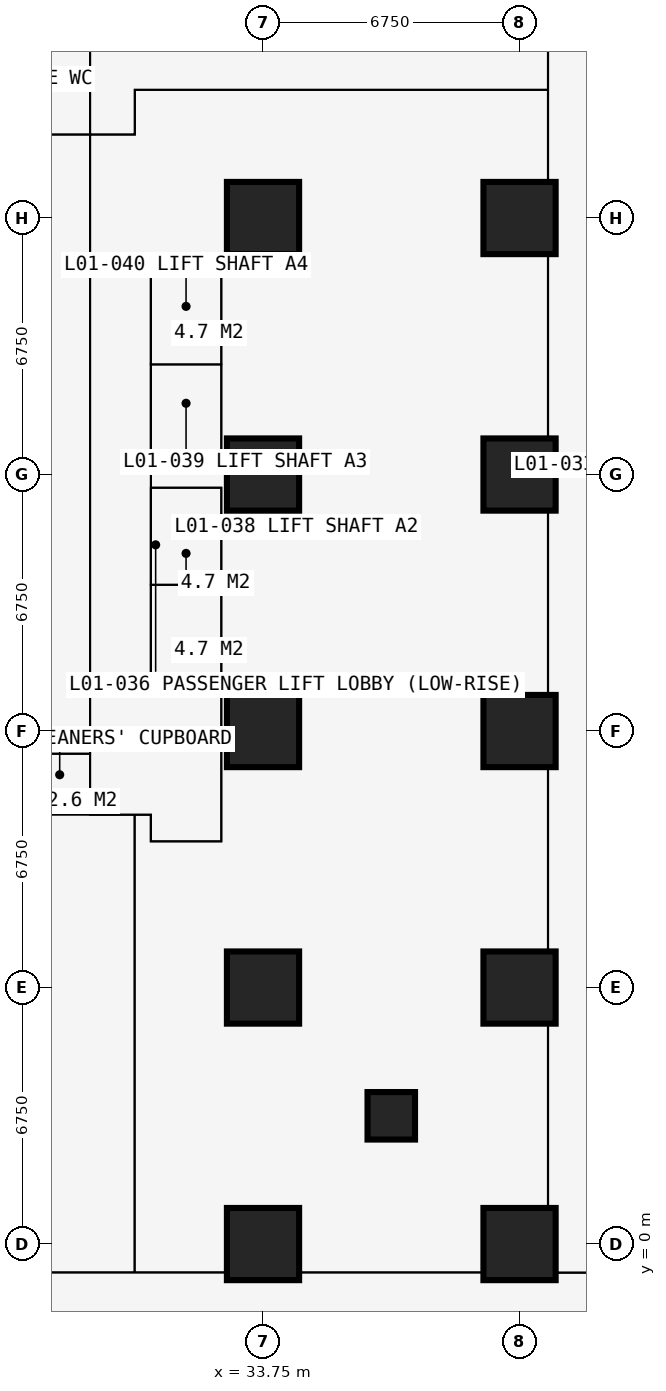
"""IFC4 building model, lengths in metres.
Left out: names, types, materials, properties, quantities, classifications, styles, units other than length and angle.
Written with IfcOpenShell. Run it as: python <this file> out.ifc"""

import sys

from ifc_helpers import new_model, si_unit, direction, frame, frame_2d, origin, origin_2d, place, context, subcontext, project, spatial, rectangle, extrude, element, fill, save


model = new_model("IFC4")
c1 = context("Model", 3, precision=1e-05, world=origin(), true_north=direction((0.0, 1.0)))
c2 = subcontext(c1, "Body", "Model", "MODEL_VIEW")
j1 = project(units=[si_unit("LENGTHUNIT", "METRE"), si_unit("PLANEANGLEUNIT", "RADIAN")], contexts=[c1])
p1 = place(None, origin())
s1 = spatial("IfcSite", under=j1, at=p1, CompositionType="ELEMENT")
p2 = place(p1, origin())
s2 = spatial("IfcBuilding", under=s1, at=p2, CompositionType="ELEMENT")
p3 = place(p2, frame((0.0, 0.0, 4.5)))
s3 = spatial("IfcBuildingStorey", under=s2, at=p3, CompositionType="ELEMENT", Elevation=4.5)
for number, where, z_axis, x_axis in (
    (1, (33.75, 0.0, 0.0), (0.0, 0.0, 1.0), (1.0, 0.0, 0.0)),
    (2, (33.75, 6.75, 0.0), (0.0, 0.0, 1.0), (1.0, 0.0, 0.0)),
    (3, (33.75, 13.5, 0.0), (0.0, 0.0, 1.0), (1.0, 0.0, 0.0)),
    (4, (33.75, 20.25, 0.0), (0.0, 0.0, 1.0), (1.0, 0.0, 0.0)),
    (5, (33.75, 27.0, 0.0), (0.0, 0.0, 1.0), (1.0, 0.0, 0.0)),
):
    element("IfcColumn", number, at=place(p3, frame(where, z_axis=z_axis, x_axis=x_axis)), inside=s3, PredefinedType="COLUMN", context=c2, shape_type="SweptSolid", body=[
        extrude(rectangle(XDim=1.9, YDim=1.9, at=origin_2d()), origin(), (0.0, 0.0, 1.0), 4.5),
    ])
p4 = place(p3, frame((37.125, 3.375, 0.0), z_axis=(0.0, 0.0, 1.0), x_axis=(1.0, 0.0, 0.0)))
e6 = element("IfcColumn", 6, at=p4, inside=s3, PredefinedType="COLUMN", context=c2, shape_type="SweptSolid", body=[
    extrude(rectangle(XDim=1.25, YDim=1.25, at=origin_2d()), origin(), (0.0, 0.0, 1.0), 4.5),
])
for number, where, z_axis, x_axis in (
    (7, (40.5, 0.0, 0.0), (0.0, 0.0, 1.0), (1.0, 0.0, 0.0)),
    (8, (40.5, 6.75, 0.0), (0.0, 0.0, 1.0), (1.0, 0.0, 0.0)),
    (9, (40.5, 13.5, 0.0), (0.0, 0.0, 1.0), (1.0, 0.0, 0.0)),
    (10, (40.5, 20.25, 0.0), (0.0, 0.0, 1.0), (1.0, 0.0, 0.0)),
    (11, (40.5, 27.0, 0.0), (0.0, 0.0, 1.0), (1.0, 0.0, 0.0)),
):
    element("IfcColumn", number, at=place(p3, frame(where, z_axis=z_axis, x_axis=x_axis)), inside=s3, PredefinedType="COLUMN", context=c2, shape_type="SweptSolid", body=[
        extrude(rectangle(XDim=1.9, YDim=1.9, at=origin_2d()), origin(), (0.0, 0.0, 1.0), 4.5),
    ])
p5 = place(p3, frame((-7.484, -0.75, 0.0), z_axis=(0.0, 0.0, 1.0), x_axis=(1.0, 0.0, 0.0)))
e12 = element("IfcWall", 12, at=p5, inside=s3, PredefinedType="PARTITIONING", context=c2, shape_type="SweptSolid", body=[
    extrude(rectangle(XDim=50.334, YDim=0.15, at=frame_2d((25.167, 0.0))), origin(), (0.0, 0.0, 1.0), 4.25),
])
p6 = place(p5, frame((18.384, 0.0, 0.0)))
e13 = element("IfcOpeningElement", 13, at=p6, cuts=e12, PredefinedType="OPENING", context=c2, shape_type="SweptSolid", body=[
    extrude(rectangle(XDim=1.6, YDim=2.4, at=frame_2d((0.8, 1.2))), frame((0.0, 0.085, 0.0), z_axis=(0.0, -1.0, 0.0), x_axis=(1.0, 0.0, 0.0)), (0.0, 0.0, 1.0), 0.17),
])
p7 = place(p5, frame((35.484, 0.0, 0.0)))
e14 = element("IfcOpeningElement", 14, at=p7, cuts=e12, PredefinedType="OPENING", context=c2, shape_type="SweptSolid", body=[
    extrude(rectangle(XDim=1.6, YDim=2.4, at=frame_2d((0.8, 1.2))), frame((0.0, 0.085, 0.0), z_axis=(0.0, -1.0, 0.0), x_axis=(1.0, 0.0, 0.0)), (0.0, 0.0, 1.0), 0.17),
])
p8 = place(p3, frame((8.9, 29.2, 0.0), z_axis=(0.0, 0.0, 1.0), x_axis=(1.0, 0.0, 0.0)))
e15 = element("IfcWall", 15, at=p8, inside=s3, PredefinedType="PARTITIONING", context=c2, shape_type="SweptSolid", body=[
    extrude(rectangle(XDim=21.475, YDim=0.15, at=frame_2d((10.738, 0.0))), origin(), (0.0, 0.0, 1.0), 4.25),
])
p9 = place(p8, frame((16.65, 0.0, 0.0)))
e16 = element("IfcOpeningElement", 16, at=p9, cuts=e15, PredefinedType="OPENING", context=c2, shape_type="SweptSolid", body=[
    extrude(rectangle(XDim=1.0, YDim=2.2, at=frame_2d((0.5, 1.1))), frame((0.0, 0.085, 0.0), z_axis=(0.0, -1.0, 0.0), x_axis=(1.0, 0.0, 0.0)), (0.0, 0.0, 1.0), 0.17),
])
p10 = place(p8, frame((18.75, 0.0, 0.0)))
e17 = element("IfcOpeningElement", 17, at=p10, cuts=e15, PredefinedType="OPENING", context=c2, shape_type="SweptSolid", body=[
    extrude(rectangle(XDim=1.0, YDim=2.2, at=frame_2d((0.5, 1.1))), frame((0.0, 0.085, 0.0), z_axis=(0.0, -1.0, 0.0), x_axis=(1.0, 0.0, 0.0)), (0.0, 0.0, 1.0), 0.17),
])
p11 = place(p8, frame((8.45, 0.0, 0.0)))
e18 = element("IfcOpeningElement", 18, at=p11, cuts=e15, PredefinedType="OPENING", context=c2, shape_type="SweptSolid", body=[
    extrude(rectangle(XDim=1.6, YDim=2.4, at=frame_2d((0.8, 1.2))), frame((0.0, 0.085, 0.0), z_axis=(0.0, -1.0, 0.0), x_axis=(1.0, 0.0, 0.0)), (0.0, 0.0, 1.0), 0.17),
])
p12 = place(p3, frame((10.125, 11.3, 0.0), z_axis=(0.0, 0.0, 1.0), x_axis=(1.0, 0.0, 0.0)))
e19 = element("IfcWall", 19, at=p12, inside=s3, PredefinedType="PARTITIONING", context=c2, shape_type="SweptSolid", body=[
    extrude(rectangle(XDim=20.675, YDim=0.15, at=frame_2d((10.337, 0.0))), origin(), (0.0, 0.0, 1.0), 4.25),
])
p13 = place(p12, frame((1.725, 0.0, 0.0)))
e20 = element("IfcOpeningElement", 20, at=p13, cuts=e19, PredefinedType="OPENING", context=c2, shape_type="SweptSolid", body=[
    extrude(rectangle(XDim=1.0, YDim=2.2, at=frame_2d((0.5, 1.1))), frame((0.0, 0.085, 0.0), z_axis=(0.0, -1.0, 0.0), x_axis=(1.0, 0.0, 0.0)), (0.0, 0.0, 1.0), 0.17),
])
p14 = place(p12, frame((3.825, 0.0, 0.0)))
e21 = element("IfcOpeningElement", 21, at=p14, cuts=e19, PredefinedType="OPENING", context=c2, shape_type="SweptSolid", body=[
    extrude(rectangle(XDim=1.0, YDim=2.2, at=frame_2d((0.5, 1.1))), frame((0.0, 0.085, 0.0), z_axis=(0.0, -1.0, 0.0), x_axis=(1.0, 0.0, 0.0)), (0.0, 0.0, 1.0), 0.17),
])
p15 = place(p12, frame((10.625, 0.0, 0.0)))
e22 = element("IfcOpeningElement", 22, at=p15, cuts=e19, PredefinedType="OPENING", context=c2, shape_type="SweptSolid", body=[
    extrude(rectangle(XDim=1.6, YDim=2.4, at=frame_2d((0.8, 1.2))), frame((0.0, 0.085, 0.0), z_axis=(0.0, -1.0, 0.0), x_axis=(1.0, 0.0, 0.0)), (0.0, 0.0, 1.0), 0.17),
])
p16 = place(p3, frame((27.6, 12.9, 0.0), z_axis=(0.0, 0.0, 1.0), x_axis=(1.0, 0.0, 0.0)))
e23 = element("IfcWall", 23, at=p16, inside=s3, PredefinedType="PARTITIONING", context=c2, shape_type="SweptSolid", body=[
    extrude(rectangle(XDim=1.6, YDim=0.15, at=frame_2d((0.8, 0.0))), origin(), (0.0, 0.0, 1.0), 3.752),
])
p17 = place(p3, frame((29.2, 11.3, 0.0), z_axis=(0.0, 0.0, 1.0), x_axis=(0.0, 1.0, 0.0)))
e24 = element("IfcWall", 24, at=p17, inside=s3, PredefinedType="PARTITIONING", context=c2, shape_type="SweptSolid", body=[
    extrude(rectangle(XDim=20.3, YDim=0.15, at=frame_2d((10.15, 0.0))), origin(), (0.0, 0.0, 1.0), 4.25),
])
p18 = place(p17, frame((15.35, 0.0, 0.0)))
e25 = element("IfcOpeningElement", 25, at=p18, cuts=e24, PredefinedType="OPENING", context=c2, shape_type="SweptSolid", body=[
    extrude(rectangle(XDim=1.6, YDim=2.4, at=frame_2d((0.8, 1.2))), frame((0.0, 0.085, 0.0), z_axis=(0.0, -1.0, 0.0), x_axis=(1.0, 0.0, 0.0)), (0.0, 0.0, 1.0), 0.17),
])
p19 = place(p17, frame((8.35, 0.0, 0.0)))
e26 = element("IfcOpeningElement", 26, at=p19, cuts=e24, PredefinedType="OPENING", context=c2, shape_type="SweptSolid", body=[
    extrude(rectangle(XDim=1.2, YDim=2.2, at=frame_2d((0.6, 1.1))), frame((0.0, 0.085, 0.0), z_axis=(0.0, -1.0, 0.0), x_axis=(1.0, 0.0, 0.0)), (0.0, 0.0, 1.0), 0.17),
])
p20 = place(p3, frame((29.2, 25.7, 0.0), z_axis=(0.0, 0.0, 1.0), x_axis=(1.0, 0.0, 0.0)))
e27 = element("IfcWall", 27, at=p20, inside=s3, PredefinedType="SHEAR", context=c2, shape_type="SweptSolid", body=[
    extrude(rectangle(XDim=3.45, YDim=0.1, at=frame_2d((1.725, 0.0))), origin(), (0.0, 0.0, 1.0), 4.25),
])
p21 = place(p3, frame((30.375, -0.75, 0.0), z_axis=(0.0, 0.0, 1.0), x_axis=(0.0, 1.0, 0.0)))
e28 = element("IfcWall", 28, at=p21, inside=s3, PredefinedType="PARTITIONING", context=c2, shape_type="SweptSolid", body=[
    extrude(rectangle(XDim=12.05, YDim=0.15, at=frame_2d((6.025, 0.0))), origin(), (0.0, 0.0, 1.0), 4.25),
])
p22 = place(p3, frame((30.375, 29.2, 0.0), z_axis=(0.0, 0.0, 1.0), x_axis=(0.0, 1.0, 0.0)))
e29 = element("IfcWall", 29, at=p22, inside=s3, PredefinedType="PARTITIONING", context=c2, shape_type="SweptSolid", body=[
    extrude(rectangle(XDim=1.175, YDim=0.15, at=frame_2d((0.587, 0.0))), origin(), (0.0, 0.0, 1.0), 4.25),
])
p23 = place(p3, frame((30.375, 30.375, 0.0), z_axis=(0.0, 0.0, 1.0), x_axis=(1.0, 0.0, 0.0)))
e30 = element("IfcWall", 30, at=p23, inside=s3, PredefinedType="PARTITIONING", context=c2, shape_type="SweptSolid", body=[
    extrude(rectangle(XDim=10.875, YDim=0.15, at=frame_2d((5.438, 0.0))), origin(), (0.0, 0.0, 1.0), 4.25),
])
p24 = place(p3, frame((30.8, 10.6, 0.0), z_axis=(0.0, 0.0, 1.0), x_axis=(0.0, 1.0, 0.0)))
e31 = element("IfcWall", 31, at=p24, inside=s3, PredefinedType="PARTITIONING", context=c2, shape_type="SweptSolid", body=[
    extrude(rectangle(XDim=0.7, YDim=0.15, at=frame_2d((0.35, 0.0))), origin(), (0.0, 0.0, 1.0), 4.25),
])
p25 = place(p3, frame((30.8, 10.6, 0.0), z_axis=(0.0, 0.0, 1.0), x_axis=(1.0, 0.0, 0.0)))
e32 = element("IfcWall", 32, at=p25, inside=s3, PredefinedType="PARTITIONING", context=c2, shape_type="SweptSolid", body=[
    extrude(rectangle(XDim=1.85, YDim=0.15, at=frame_2d((0.925, 0.0))), origin(), (0.0, 0.0, 1.0), 4.25),
])
p26 = place(p3, frame((30.8, 14.8, 0.0), z_axis=(0.0, 0.0, 1.0), x_axis=(0.0, 1.0, 0.0)))
e33 = element("IfcWall", 33, at=p26, inside=s3, PredefinedType="PARTITIONING", context=c2, shape_type="SweptSolid", body=[
    extrude(rectangle(XDim=10.9, YDim=0.15, at=frame_2d((5.45, 0.0))), origin(), (0.0, 0.0, 1.0), 4.25),
])
p27 = place(p26, frame((0.75, 0.0, 0.0)))
e34 = element("IfcOpeningElement", 34, at=p27, cuts=e33, PredefinedType="OPENING", context=c2, shape_type="SweptSolid", body=[
    extrude(rectangle(XDim=1.1, YDim=2.2, at=frame_2d((0.55, 1.1))), frame((0.0, 0.085, 0.0), z_axis=(0.0, -1.0, 0.0), x_axis=(1.0, 0.0, 0.0)), (0.0, 0.0, 1.0), 0.17),
])
p28 = place(p26, frame((3.25, 0.0, 0.0)))
e35 = element("IfcOpeningElement", 35, at=p28, cuts=e33, PredefinedType="OPENING", context=c2, shape_type="SweptSolid", body=[
    extrude(rectangle(XDim=1.1, YDim=2.2, at=frame_2d((0.55, 1.1))), frame((0.0, 0.085, 0.0), z_axis=(0.0, -1.0, 0.0), x_axis=(1.0, 0.0, 0.0)), (0.0, 0.0, 1.0), 0.17),
])
p29 = place(p26, frame((6.5, 0.0, 0.0)))
e36 = element("IfcOpeningElement", 36, at=p29, cuts=e33, PredefinedType="OPENING", context=c2, shape_type="SweptSolid", body=[
    extrude(rectangle(XDim=1.1, YDim=2.2, at=frame_2d((0.55, 1.1))), frame((0.0, 0.085, 0.0), z_axis=(0.0, -1.0, 0.0), x_axis=(1.0, 0.0, 0.0)), (0.0, 0.0, 1.0), 0.17),
])
p30 = place(p26, frame((9.05, 0.0, 0.0)))
e37 = element("IfcOpeningElement", 37, at=p30, cuts=e33, PredefinedType="OPENING", context=c2, shape_type="SweptSolid", body=[
    extrude(rectangle(XDim=1.1, YDim=2.2, at=frame_2d((0.55, 1.1))), frame((0.0, 0.085, 0.0), z_axis=(0.0, -1.0, 0.0), x_axis=(1.0, 0.0, 0.0)), (0.0, 0.0, 1.0), 0.17),
])
for number, where, z_axis, x_axis in (
    (38, (30.8, 14.8, 0.0), (0.0, 0.0, 1.0), (1.0, 0.0, 0.0)),
    (39, (30.8, 17.35, 0.0), (0.0, 0.0, 1.0), (1.0, 0.0, 0.0)),
    (40, (30.8, 19.9, 0.0), (0.0, 0.0, 1.0), (1.0, 0.0, 0.0)),
    (41, (30.8, 20.6, 0.0), (0.0, 0.0, 1.0), (1.0, 0.0, 0.0)),
    (42, (30.8, 23.15, 0.0), (0.0, 0.0, 1.0), (1.0, 0.0, 0.0)),
):
    element("IfcWall", number, at=place(p3, frame(where, z_axis=z_axis, x_axis=x_axis)), inside=s3, PredefinedType="SHEAR", context=c2, shape_type="SweptSolid", body=[
        extrude(rectangle(XDim=1.85, YDim=0.1, at=frame_2d((0.925, 0.0))), origin(), (0.0, 0.0, 1.0), 4.25),
    ])
p31 = place(p3, frame((32.65, 10.6, 0.0), z_axis=(0.0, 0.0, 1.0), x_axis=(0.0, 1.0, 0.0)))
e43 = element("IfcWall", 43, at=p31, inside=s3, PredefinedType="SHEAR", context=c2, shape_type="SweptSolid", body=[
    extrude(rectangle(XDim=9.3, YDim=0.1, at=frame_2d((4.65, 0.0))), origin(), (0.0, 0.0, 1.0), 4.25),
])
p32 = place(p3, frame((32.65, 20.6, 0.0), z_axis=(0.0, 0.0, 1.0), x_axis=(0.0, 1.0, 0.0)))
e44 = element("IfcWall", 44, at=p32, inside=s3, PredefinedType="PARTITIONING", context=c2, shape_type="SweptSolid", body=[
    extrude(rectangle(XDim=5.1, YDim=0.15, at=frame_2d((2.55, 0.0))), origin(), (0.0, 0.0, 1.0), 4.25),
])
p33 = place(p3, frame((41.25, -0.75, 0.0), z_axis=(0.0, 0.0, 1.0), x_axis=(0.0, 1.0, 0.0)))
e45 = element("IfcWall", 45, at=p33, inside=s3, PredefinedType="PARTITIONING", context=c2, shape_type="SweptSolid", body=[
    extrude(rectangle(XDim=41.984, YDim=0.15, at=frame_2d((20.992, 0.0))), origin(), (0.0, 0.0, 1.0), 4.25),
])
p34 = place(p33, frame((15.2, 0.0, 0.0)))
e46 = element("IfcOpeningElement", 46, at=p34, cuts=e45, PredefinedType="OPENING", context=c2, shape_type="SweptSolid", body=[
    extrude(rectangle(XDim=1.6, YDim=2.4, at=frame_2d((0.8, 1.2))), frame((0.0, 0.085, 0.0), z_axis=(0.0, -1.0, 0.0), x_axis=(1.0, 0.0, 0.0)), (0.0, 0.0, 1.0), 0.17),
])
p35 = place(p18, origin())
e47 = element("IfcDoor", 47, at=p35, inside=s3, OperationType="DOUBLE_DOOR_SINGLE_SWING", PredefinedType="DOOR", context=c2, shape_type="SweptSolid", body=[
    extrude(rectangle(XDim=1.6, YDim=2.4, at=frame_2d((0.8, 1.2))), frame((0.0, 0.025, 0.0), z_axis=(0.0, -1.0, 0.0), x_axis=(1.0, 0.0, 0.0)), (0.0, 0.0, 1.0), 0.05),
])
fill(e25, e47)
p36 = place(p10, origin())
e48 = element("IfcDoor", 48, at=p36, inside=s3, OperationType="SINGLE_SWING_LEFT", PredefinedType="DOOR", context=c2, shape_type="SweptSolid", body=[
    extrude(rectangle(XDim=1.0, YDim=2.2, at=frame_2d((0.5, 1.1))), frame((0.0, 0.025, 0.0), z_axis=(0.0, -1.0, 0.0), x_axis=(1.0, 0.0, 0.0)), (0.0, 0.0, 1.0), 0.05),
])
fill(e17, e48)
p37 = place(p7, origin())
e49 = element("IfcDoor", 49, at=p37, inside=s3, OperationType="DOUBLE_DOOR_SINGLE_SWING", PredefinedType="DOOR", context=c2, shape_type="SweptSolid", body=[
    extrude(rectangle(XDim=1.6, YDim=2.4, at=frame_2d((0.8, 1.2))), frame((0.0, 0.025, 0.0), z_axis=(0.0, -1.0, 0.0), x_axis=(1.0, 0.0, 0.0)), (0.0, 0.0, 1.0), 0.05),
])
fill(e14, e49)
p38 = place(p34, origin())
e50 = element("IfcDoor", 50, at=p38, inside=s3, OperationType="DOUBLE_DOOR_SINGLE_SWING", PredefinedType="DOOR", context=c2, shape_type="SweptSolid", body=[
    extrude(rectangle(XDim=1.6, YDim=2.4, at=frame_2d((0.8, 1.2))), frame((0.0, 0.025, 0.0), z_axis=(0.0, -1.0, 0.0), x_axis=(1.0, 0.0, 0.0)), (0.0, 0.0, 1.0), 0.05),
])
fill(e46, e50)
p39 = place(p27, origin())
e51 = element("IfcDoor", 51, at=p39, inside=s3, OperationType="DOUBLE_DOOR_SLIDING", PredefinedType="DOOR", context=c2, shape_type="SweptSolid", body=[
    extrude(rectangle(XDim=1.1, YDim=2.2, at=frame_2d((0.55, 1.1))), frame((0.0, 0.025, 0.0), z_axis=(0.0, -1.0, 0.0), x_axis=(1.0, 0.0, 0.0)), (0.0, 0.0, 1.0), 0.05),
])
fill(e34, e51)
p40 = place(p28, origin())
e52 = element("IfcDoor", 52, at=p40, inside=s3, OperationType="DOUBLE_DOOR_SLIDING", PredefinedType="DOOR", context=c2, shape_type="SweptSolid", body=[
    extrude(rectangle(XDim=1.1, YDim=2.2, at=frame_2d((0.55, 1.1))), frame((0.0, 0.025, 0.0), z_axis=(0.0, -1.0, 0.0), x_axis=(1.0, 0.0, 0.0)), (0.0, 0.0, 1.0), 0.05),
])
fill(e35, e52)
p41 = place(p29, origin())
e53 = element("IfcDoor", 53, at=p41, inside=s3, OperationType="DOUBLE_DOOR_SLIDING", PredefinedType="DOOR", context=c2, shape_type="SweptSolid", body=[
    extrude(rectangle(XDim=1.1, YDim=2.2, at=frame_2d((0.55, 1.1))), frame((0.0, 0.025, 0.0), z_axis=(0.0, -1.0, 0.0), x_axis=(1.0, 0.0, 0.0)), (0.0, 0.0, 1.0), 0.05),
])
fill(e36, e53)
p42 = place(p30, origin())
e54 = element("IfcDoor", 54, at=p42, inside=s3, OperationType="DOUBLE_DOOR_SLIDING", PredefinedType="DOOR", context=c2, shape_type="SweptSolid", body=[
    extrude(rectangle(XDim=1.1, YDim=2.2, at=frame_2d((0.55, 1.1))), frame((0.0, 0.025, 0.0), z_axis=(0.0, -1.0, 0.0), x_axis=(1.0, 0.0, 0.0)), (0.0, 0.0, 1.0), 0.05),
])
fill(e37, e54)
p43 = place(p19, origin())
e55 = element("IfcDoor", 55, at=p43, inside=s3, OperationType="DOUBLE_DOOR_SINGLE_SWING", PredefinedType="DOOR", context=c2, shape_type="SweptSolid", body=[
    extrude(rectangle(XDim=1.2, YDim=2.2, at=frame_2d((0.6, 1.1))), frame((0.0, 0.025, 0.0), z_axis=(0.0, -1.0, 0.0), x_axis=(1.0, 0.0, 0.0)), (0.0, 0.0, 1.0), 0.05),
])
fill(e26, e55)
save(model, sys.argv[1])
